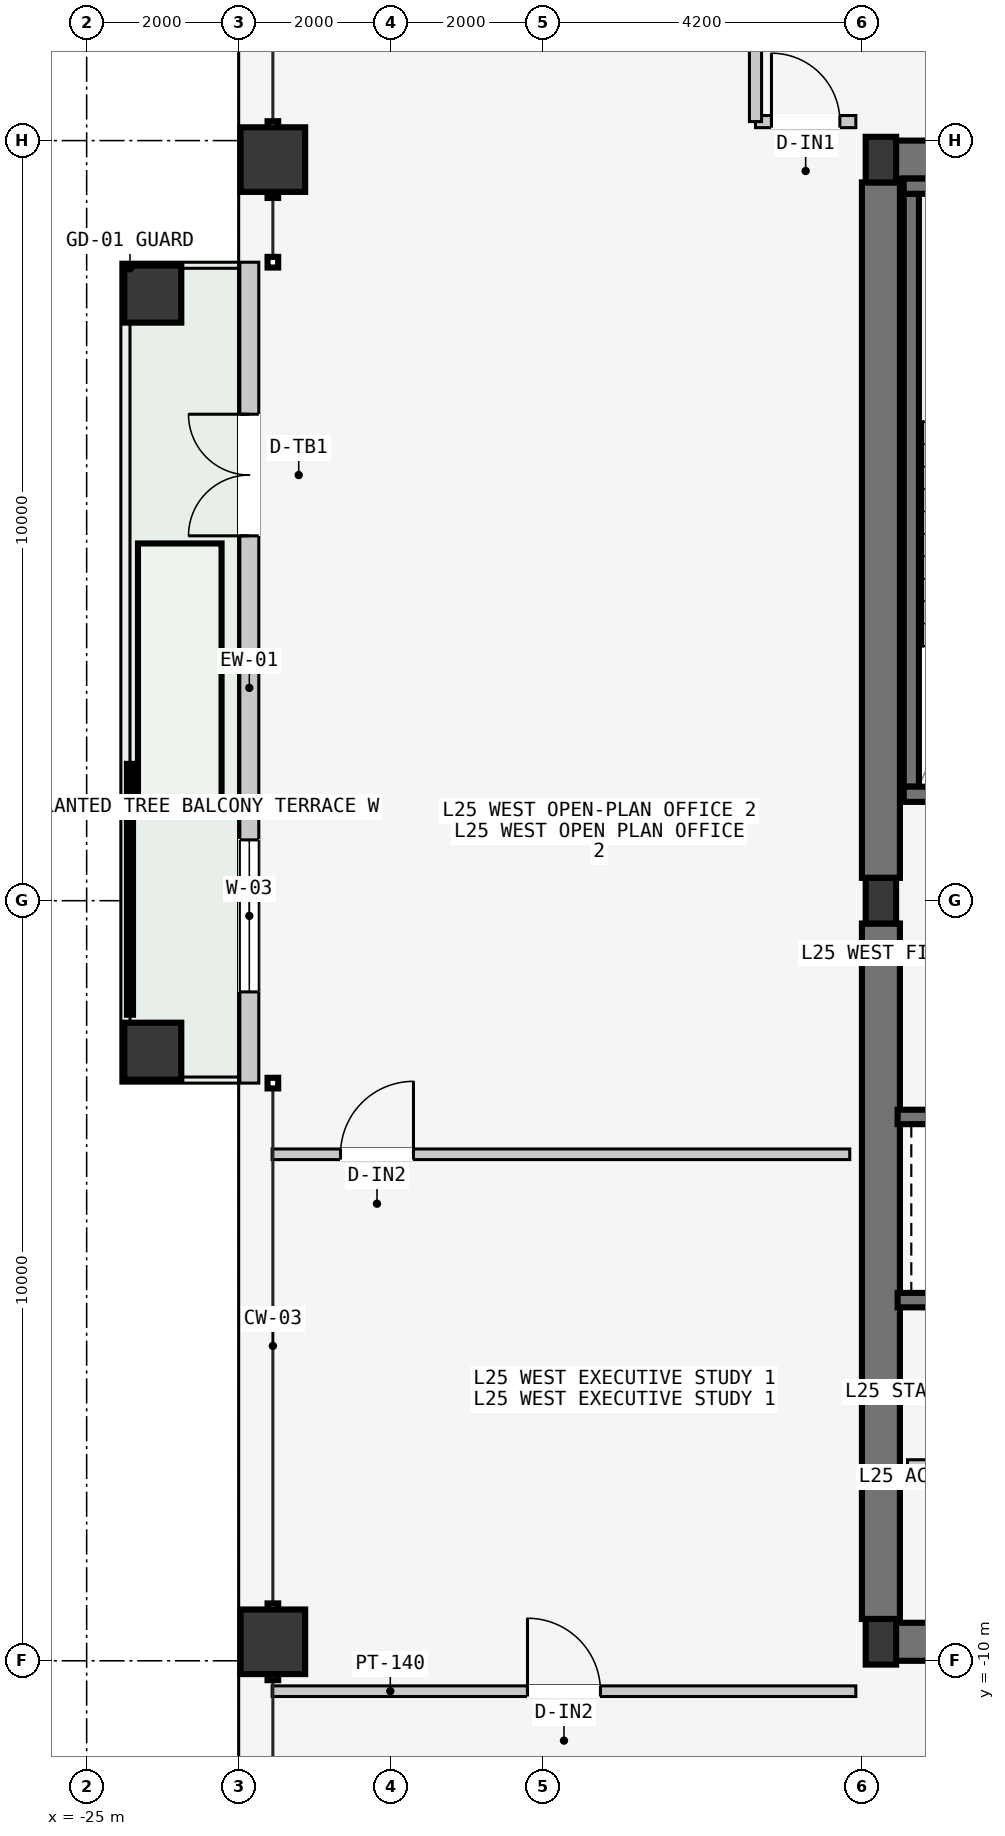
"""IFC4 building model, lengths in metres.
Left out: names, types, materials, properties, quantities, classifications, styles, units other than length and angle.
Written with IfcOpenShell. Run it as: python <this file> out.ifc"""

import sys

from ifc_helpers import new_model, si_unit, direction, frame, frame_2d, origin, origin_2d, place, context, subcontext, project, spatial, rectangle, hollow_rectangle, i_section, extrude, element, fill, save


model = new_model("IFC4")
c1 = context("Model", 3, precision=1e-05, world=origin(), true_north=direction((0.0, 1.0)))
c2 = subcontext(c1, "Body", "Model", "MODEL_VIEW")
j1 = project(units=[si_unit("LENGTHUNIT", "METRE"), si_unit("PLANEANGLEUNIT", "RADIAN")], contexts=[c1])
p1 = place(None, origin())
s1 = spatial("IfcSite", under=j1, at=p1, CompositionType="ELEMENT")
p2 = place(p1, origin())
s2 = spatial("IfcBuilding", under=s1, at=p2, CompositionType="ELEMENT")
p3 = place(p2, frame((0.0, 0.0, 99.0)))
s3 = spatial("IfcBuildingStorey", under=s2, at=p3, CompositionType="ELEMENT", Elevation=99.0)
for number, where, z_axis, x_axis in (
    (1, (-14.53, -9.75, -0.2), (0.0, 0.0, 1.0), (1.0, 0.0, 0.0)),
    (2, (-14.53, 9.75, -0.2), (0.0, 0.0, 1.0), (1.0, 0.0, 0.0)),
):
    element("IfcWall", number, at=place(p3, frame(where, z_axis=z_axis, x_axis=x_axis)), inside=s3, PredefinedType="SHEAR", context=c2, shape_type="SweptSolid", body=[
        extrude(rectangle(XDim=6.46, YDim=0.5, at=frame_2d((3.23, 0.0))), origin(), (0.0, 0.0, 1.0), 3.6),
    ])
for number, where, z_axis, x_axis in (
    (3, (-14.55, -9.45, -0.2), (0.0, 0.0, 1.0), (0.0, 1.0, 0.0)),
    (4, (-14.55, 0.3, -0.2), (0.0, 0.0, 1.0), (0.0, 1.0, 0.0)),
):
    element("IfcWall", number, at=place(p3, frame(where, z_axis=z_axis, x_axis=x_axis)), inside=s3, PredefinedType="SHEAR", context=c2, shape_type="SweptSolid", body=[
        extrude(rectangle(XDim=9.15, YDim=0.5, at=frame_2d((4.575, 0.0))), origin(), (0.0, 0.0, 1.0), 3.6),
    ])
p4 = place(p3, frame((-14.15, 1.5, -0.2), z_axis=(0.0, 0.0, 1.0), x_axis=(0.0, 1.0, 0.0)))
e5 = element("IfcWall", 5, at=p4, inside=s3, PredefinedType="SOLIDWALL", context=c2, shape_type="SweptSolid", body=[
    extrude(rectangle(XDim=7.8, YDim=0.2, at=frame_2d((3.9, 0.0))), origin(), (0.0, 0.0, 1.0), 3.6),
])
p5 = place(p3, frame((-14.25, 1.4, -0.2), z_axis=(0.0, 0.0, 1.0), x_axis=(1.0, 0.0, 0.0)))
e6 = element("IfcWall", 6, at=p5, inside=s3, PredefinedType="SOLIDWALL", context=c2, shape_type="SweptSolid", body=[
    extrude(rectangle(XDim=3.72, YDim=0.2, at=frame_2d((1.86, 0.0))), origin(), (0.0, 0.0, 1.0), 3.6),
])
p6 = place(p5, frame((1.5, 0.0, 0.2)))
e7 = element("IfcOpeningElement", 7, at=p6, cuts=e6, PredefinedType="OPENING", context=c2, shape_type="SweptSolid", body=[
    extrude(rectangle(XDim=1.12, YDim=2.18, at=frame_2d((0.56, 1.09))), frame((0.0, 0.11, 0.0), z_axis=(0.0, -1.0, 0.0), x_axis=(1.0, 0.0, 0.0)), (0.0, 0.0, 1.0), 0.22),
])
p7 = place(p3, frame((-14.25, 9.4, -0.2), z_axis=(0.0, 0.0, 1.0), x_axis=(1.0, 0.0, 0.0)))
e8 = element("IfcWall", 8, at=p7, inside=s3, PredefinedType="SOLIDWALL", context=c2, shape_type="SweptSolid", body=[
    extrude(rectangle(XDim=3.72, YDim=0.2, at=frame_2d((1.86, 0.0))), origin(), (0.0, 0.0, 1.0), 3.6),
])
for number, where, z_axis, x_axis in (
    (9, (-14.55, -9.75, 0.0), (0.0, 0.0, 1.0), (1.0, 0.0, 0.0)),
    (10, (-14.55, 0.0, 0.0), (0.0, 0.0, 1.0), (1.0, 0.0, 0.0)),
    (11, (-14.55, 9.75, 0.0), (0.0, 0.0, 1.0), (1.0, 0.0, 0.0)),
):
    element("IfcColumn", number, at=place(p3, frame(where, z_axis=z_axis, x_axis=x_axis)), inside=s3, PredefinedType="COLUMN", context=c2, shape_type="SweptSolid", body=[
        extrude(i_section(OverallWidth=0.4, OverallDepth=0.6, WebThickness=0.022, FlangeThickness=0.036, at=origin_2d()), origin(), (0.0, 0.0, 1.0), 3.6),
    ])
for number, where, z_axis, x_axis in (
    (12, (-22.55, -9.75, 0.0), (0.0, 0.0, 1.0), (0.0, 1.0, 0.0)),
    (13, (-22.55, 9.75, 0.0), (0.0, 0.0, 1.0), (0.0, 1.0, 0.0)),
):
    element("IfcColumn", number, at=place(p3, frame(where, z_axis=z_axis, x_axis=x_axis)), inside=s3, PredefinedType="COLUMN", context=c2, shape_type="SweptSolid", body=[
        extrude(hollow_rectangle(XDim=0.85, YDim=0.85, WallThickness=0.04, at=origin_2d()), origin(), (0.0, 0.0, 1.0), 3.6),
    ])
for number, where, z_axis, x_axis in (
    (14, (-24.13, -1.98, 0.0), (0.0, 0.0, 1.0), (0.0, 1.0, 0.0)),
    (15, (-24.13, 7.98, 0.0), (0.0, 0.0, 1.0), (0.0, 1.0, 0.0)),
):
    element("IfcColumn", number, at=place(p3, frame(where, z_axis=z_axis, x_axis=x_axis)), inside=s3, PredefinedType="COLUMN", context=c2, shape_type="SweptSolid", body=[
        extrude(hollow_rectangle(XDim=0.75, YDim=0.75, WallThickness=0.032, at=origin_2d()), origin(), (0.0, 0.0, 1.0), 3.6),
    ])
p8 = place(p3, frame((-22.86, -2.4, 0.0), z_axis=(0.0, 0.0, 1.0), x_axis=(0.0, 1.0, 0.0)))
e16 = element("IfcWall", 16, at=p8, inside=s3, PredefinedType="STANDARD", context=c2, shape_type="SweptSolid", body=[
    extrude(rectangle(XDim=10.8, YDim=0.25, at=frame_2d((5.4, 0.0))), origin(), (0.0, 0.0, 1.0), 3.4),
])
p9 = place(p8, frame((7.2, 0.0, 0.0)))
e17 = element("IfcOpeningElement", 17, at=p9, cuts=e16, PredefinedType="OPENING", context=c2, shape_type="SweptSolid", body=[
    extrude(rectangle(XDim=1.6, YDim=2.2, at=frame_2d((0.8, 1.1))), frame((0.0, 0.135, 0.0), z_axis=(0.0, -1.0, 0.0), x_axis=(1.0, 0.0, 0.0)), (0.0, 0.0, 1.0), 0.27),
])
p10 = place(p8, frame((1.2, 0.0, 0.85)))
e18 = element("IfcOpeningElement", 18, at=p10, cuts=e16, PredefinedType="OPENING", context=c2, shape_type="SweptSolid", body=[
    extrude(rectangle(XDim=2.0, YDim=2.1, at=frame_2d((1.0, 1.05))), frame((0.0, 0.135, 0.0), z_axis=(0.0, -1.0, 0.0), x_axis=(1.0, 0.0, 0.0)), (0.0, 0.0, 1.0), 0.27),
])
p11 = place(p3, frame((-14.33, -2.845, -0.2), z_axis=(0.0, 0.0, 1.0), x_axis=(1.0, 0.0, 0.0)))
e19 = element("IfcWall", 19, at=p11, inside=s3, PredefinedType="SOLIDWALL", context=c2, shape_type="SweptSolid", body=[
    extrude(rectangle(XDim=2.68, YDim=0.19, at=frame_2d((1.34, 0.0))), origin(), (0.0, 0.0, 1.0), 3.6),
])
p12 = place(p11, frame((0.83, 0.0, 0.2)))
e20 = element("IfcOpeningElement", 20, at=p12, cuts=e19, PredefinedType="OPENING", context=c2, shape_type="SweptSolid", body=[
    extrude(rectangle(XDim=1.2, YDim=2.2, at=frame_2d((0.6, 1.1))), frame((0.0, 0.105, 0.0), z_axis=(0.0, -1.0, 0.0), x_axis=(1.0, 0.0, 0.0)), (0.0, 0.0, 1.0), 0.21),
])
p13 = place(p3, frame((-14.33, -5.255, -0.2), z_axis=(0.0, 0.0, 1.0), x_axis=(1.0, 0.0, 0.0)))
e21 = element("IfcWall", 21, at=p13, inside=s3, PredefinedType="SOLIDWALL", context=c2, shape_type="SweptSolid", body=[
    extrude(rectangle(XDim=2.68, YDim=0.19, at=frame_2d((1.34, 0.0))), origin(), (0.0, 0.0, 1.0), 3.6),
])
p14 = place(p3, frame((-11.7, -7.425, 0.0), z_axis=(0.0, 0.0, 1.0), x_axis=(-1.0, 0.0, 0.0)))
e22 = element("IfcWall", 22, at=p14, inside=s3, PredefinedType="PARTITIONING", context=c2, shape_type="SweptSolid", body=[
    extrude(rectangle(XDim=2.5, YDim=0.14, at=frame_2d((1.25, 0.0))), origin(), (0.0, 0.0, 1.0), 3.4),
])
p15 = place(p3, frame((-22.56, -10.4, 0.0), z_axis=(0.0, 0.0, 1.0), x_axis=(1.0, 0.0, 0.0)))
e23 = element("IfcWall", 23, at=p15, inside=s3, PredefinedType="PARTITIONING", context=c2, shape_type="SweptSolid", body=[
    extrude(rectangle(XDim=7.68, YDim=0.14, at=frame_2d((3.84, 0.0))), origin(), (0.0, 0.0, 1.0), 3.4),
])
p16 = place(p15, frame((3.36, 0.0, 0.0)))
e24 = element("IfcOpeningElement", 24, at=p16, cuts=e23, PredefinedType="OPENING", context=c2, shape_type="SweptSolid", body=[
    extrude(rectangle(XDim=0.96, YDim=2.18, at=frame_2d((0.48, 1.09))), frame((0.0, 0.08, 0.0), z_axis=(0.0, -1.0, 0.0), x_axis=(1.0, 0.0, 0.0)), (0.0, 0.0, 1.0), 0.16),
])
p17 = place(p3, frame((-16.2, 10.25, 0.0), z_axis=(0.0, 0.0, 1.0), x_axis=(1.0, 0.0, 0.0)))
e25 = element("IfcWall", 25, at=p17, inside=s3, PredefinedType="PARTITIONING", context=c2, shape_type="SweptSolid", body=[
    extrude(rectangle(XDim=1.32, YDim=0.16, at=frame_2d((0.66, 0.0))), origin(), (0.0, 0.0, 1.0), 3.4),
])
p18 = place(p17, frame((0.21, 0.0, 0.0)))
e26 = element("IfcOpeningElement", 26, at=p18, cuts=e25, PredefinedType="OPENING", context=c2, shape_type="SweptSolid", body=[
    extrude(rectangle(XDim=0.9, YDim=2.15, at=frame_2d((0.45, 1.075))), frame((0.0, 0.09, 0.0), z_axis=(0.0, -1.0, 0.0), x_axis=(1.0, 0.0, 0.0)), (0.0, 0.0, 1.0), 0.18),
])
p19 = place(p3, frame((-16.2, 10.25, 0.0), z_axis=(0.0, 0.0, 1.0), x_axis=(0.0, 1.0, 0.0)))
e27 = element("IfcWall", 27, at=p19, inside=s3, PredefinedType="PARTITIONING", context=c2, shape_type="SweptSolid", body=[
    extrude(rectangle(XDim=1.95, YDim=0.16, at=frame_2d((0.975, 0.0))), origin(), (0.0, 0.0, 1.0), 3.4),
])
p20 = place(p3, frame((-22.56, -3.336, 0.0), z_axis=(0.0, 0.0, 1.0), x_axis=(1.0, 0.0, 0.0)))
e28 = element("IfcWall", 28, at=p20, inside=s3, PredefinedType="PARTITIONING", context=c2, shape_type="SweptSolid", body=[
    extrude(rectangle(XDim=7.6, YDim=0.14, at=frame_2d((3.8, 0.0))), origin(), (0.0, 0.0, 1.0), 3.0),
])
p21 = place(p20, frame((0.9, 0.0, 0.0)))
e29 = element("IfcOpeningElement", 29, at=p21, cuts=e28, PredefinedType="OPENING", context=c2, shape_type="SweptSolid", body=[
    extrude(rectangle(XDim=0.96, YDim=2.18, at=frame_2d((0.48, 1.09))), frame((0.0, 0.08, 0.0), z_axis=(0.0, -1.0, 0.0), x_axis=(1.0, 0.0, 0.0)), (0.0, 0.0, 1.0), 0.16),
])
p22 = place(p9, origin())
e30 = element("IfcDoor", 30, at=p22, inside=s3, OperationType="DOUBLE_DOOR_SINGLE_SWING", PredefinedType="DOOR", context=c2, shape_type="SweptSolid", body=[
    extrude(rectangle(XDim=1.6, YDim=2.2, at=frame_2d((0.8, 1.1))), frame((0.0, 0.025, 0.0), z_axis=(0.0, -1.0, 0.0), x_axis=(1.0, 0.0, 0.0)), (0.0, 0.0, 1.0), 0.05),
])
fill(e17, e30)
p23 = place(p10, origin())
e31 = element("IfcWindow", 31, at=p23, inside=s3, PartitioningType="SINGLE_PANEL", PredefinedType="WINDOW", context=c2, shape_type="SweptSolid", body=[
    extrude(rectangle(XDim=2.0, YDim=2.1, at=frame_2d((1.0, 1.05))), frame((0.0, 0.03, 0.0), z_axis=(0.0, -1.0, 0.0), x_axis=(1.0, 0.0, 0.0)), (0.0, 0.0, 1.0), 0.06),
])
fill(e18, e31)
p24 = place(p16, origin())
e32 = element("IfcDoor", 32, at=p24, inside=s3, OperationType="SINGLE_SWING_LEFT", PredefinedType="DOOR", context=c2, shape_type="SweptSolid", body=[
    extrude(rectangle(XDim=0.96, YDim=2.18, at=frame_2d((0.48, 1.09))), frame((0.0, 0.025, 0.0), z_axis=(0.0, -1.0, 0.0), x_axis=(1.0, 0.0, 0.0)), (0.0, 0.0, 1.0), 0.05),
])
fill(e24, e32)
p25 = place(p18, origin())
e33 = element("IfcDoor", 33, at=p25, inside=s3, OperationType="SINGLE_SWING_LEFT", PredefinedType="DOOR", context=c2, shape_type="SweptSolid", body=[
    extrude(rectangle(XDim=0.9, YDim=2.15, at=frame_2d((0.45, 1.075))), frame((0.0, 0.025, 0.0), z_axis=(0.0, -1.0, 0.0), x_axis=(1.0, 0.0, 0.0)), (0.0, 0.0, 1.0), 0.05),
])
fill(e26, e33)
p26 = place(p21, origin())
e34 = element("IfcDoor", 34, at=p26, inside=s3, OperationType="SINGLE_SWING_RIGHT", PredefinedType="DOOR", context=c2, shape_type="SweptSolid", body=[
    extrude(rectangle(XDim=0.96, YDim=2.18, at=frame_2d((0.48, 1.09))), frame((0.0, 0.025, 0.0), z_axis=(0.0, -1.0, 0.0), x_axis=(1.0, 0.0, 0.0)), (0.0, 0.0, 1.0), 0.05),
])
fill(e29, e34)
save(model, sys.argv[1])
